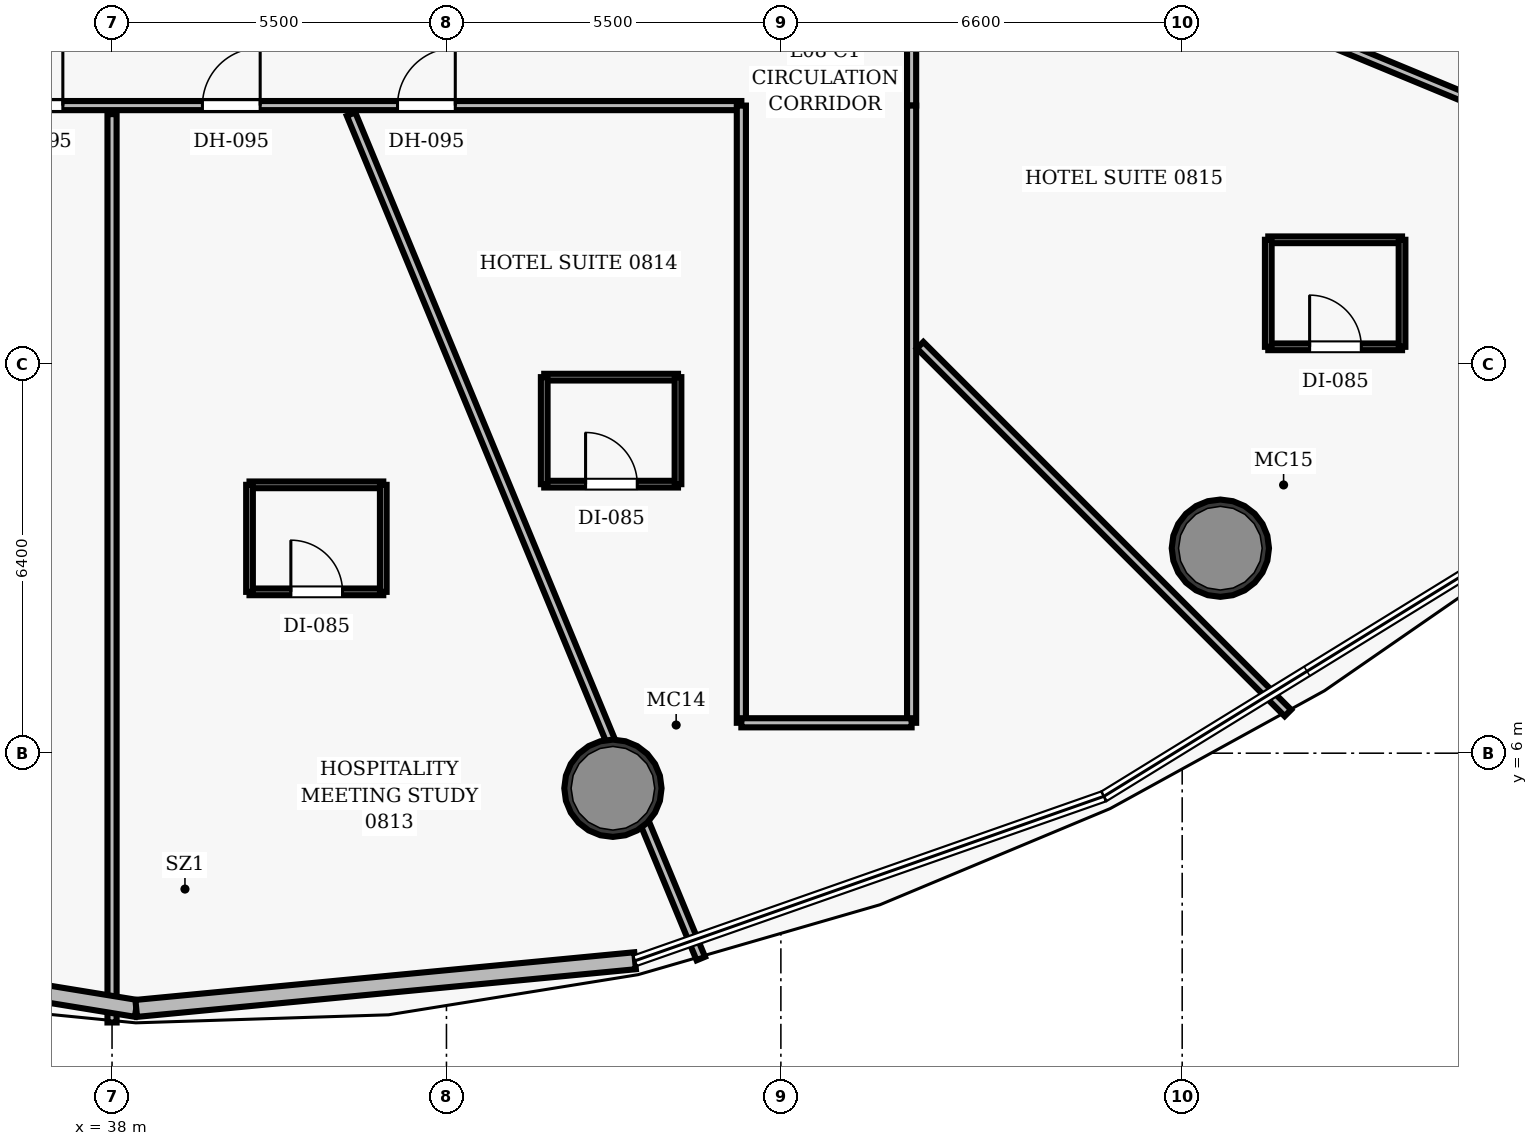
"""IFC4 building model, lengths in metres.
Left out: names, types, materials, properties, quantities, classifications, styles, units other than length and angle.
Written with IfcOpenShell. Run it as: python <this file> out.ifc"""

import sys

from ifc_helpers import new_model, si_unit, direction, frame, frame_2d, origin, origin_2d, place, context, subcontext, project, spatial, rectangle, hollow_circle, extrude, element, fill, save


model = new_model("IFC4")
c1 = context("Model", 3, precision=1e-05, world=origin(), true_north=direction((0.0, 1.0)))
c2 = subcontext(c1, "Body", "Model", "MODEL_VIEW")
j1 = project(units=[si_unit("LENGTHUNIT", "METRE"), si_unit("PLANEANGLEUNIT", "RADIAN")], contexts=[c1])
p1 = place(None, origin())
s1 = spatial("IfcSite", under=j1, at=p1, CompositionType="ELEMENT")
p2 = place(p1, origin())
s2 = spatial("IfcBuilding", under=s1, at=p2, CompositionType="ELEMENT")
p3 = place(p2, frame((0.0, 0.0, 44.9)))
s3 = spatial("IfcBuildingStorey", under=s2, at=p3, CompositionType="ELEMENT", Elevation=44.9)
for number, where, z_axis, x_axis in (
    (1, (46.238, 5.423, 0.0), (0.0, 0.0, 1.0), (1.0, 0.0, 0.0)),
    (2, (56.228, 9.371, 0.0), (0.0, 0.0, 1.0), (1.0, 0.0, 0.0)),
):
    element("IfcColumn", number, at=place(p3, frame(where, z_axis=z_axis, x_axis=x_axis)), inside=s3, PredefinedType="COLUMN", context=c2, shape_type="SweptSolid", body=[
        extrude(hollow_circle(Radius=0.8, WallThickness=0.06, at=origin_2d()), origin(), (0.0, 0.0, 1.0), 3.5),
    ])
p4 = place(p3, frame((24.85, 16.65, 0.0), z_axis=(0.0, 0.0, 1.0), x_axis=(1.0, 0.0, 0.0)))
e3 = element("IfcWall", 3, at=p4, inside=s3, PredefinedType="PARTITIONING", context=c2, shape_type="SweptSolid", body=[
    extrude(rectangle(XDim=23.5, YDim=0.15, at=frame_2d((11.75, 0.0))), origin(), (0.0, 0.0, 1.0), 2.6),
])
p5 = place(p4, frame((7.505, 0.0, 0.0)))
e4 = element("IfcOpeningElement", 4, at=p5, cuts=e3, PredefinedType="OPENING", context=c2, shape_type="SweptSolid", body=[
    extrude(rectangle(XDim=0.95, YDim=2.15, at=frame_2d((0.475, 1.075))), frame((0.0, 0.085, 0.0), z_axis=(0.0, -1.0, 0.0), x_axis=(1.0, 0.0, 0.0)), (0.0, 0.0, 1.0), 0.17),
])
p6 = place(p4, frame((11.391, 0.0, 0.0)))
e5 = element("IfcOpeningElement", 5, at=p6, cuts=e3, PredefinedType="OPENING", context=c2, shape_type="SweptSolid", body=[
    extrude(rectangle(XDim=0.95, YDim=2.15, at=frame_2d((0.475, 1.075))), frame((0.0, 0.085, 0.0), z_axis=(0.0, -1.0, 0.0), x_axis=(1.0, 0.0, 0.0)), (0.0, 0.0, 1.0), 0.17),
])
p7 = place(p4, frame((14.636, 0.0, 0.0)))
e6 = element("IfcOpeningElement", 6, at=p7, cuts=e3, PredefinedType="OPENING", context=c2, shape_type="SweptSolid", body=[
    extrude(rectangle(XDim=0.95, YDim=2.15, at=frame_2d((0.475, 1.075))), frame((0.0, 0.085, 0.0), z_axis=(0.0, -1.0, 0.0), x_axis=(1.0, 0.0, 0.0)), (0.0, 0.0, 1.0), 0.17),
])
p8 = place(p4, frame((17.845, 0.0, 0.0)))
e7 = element("IfcOpeningElement", 7, at=p8, cuts=e3, PredefinedType="OPENING", context=c2, shape_type="SweptSolid", body=[
    extrude(rectangle(XDim=0.95, YDim=2.15, at=frame_2d((0.475, 1.075))), frame((0.0, 0.085, 0.0), z_axis=(0.0, -1.0, 0.0), x_axis=(1.0, 0.0, 0.0)), (0.0, 0.0, 1.0), 0.17),
])
p9 = place(p3, frame((51.15, 16.65, 0.0), z_axis=(0.0, 0.0, 1.0), x_axis=(0.0, 1.0, 0.0)))
e8 = element("IfcWall", 8, at=p9, inside=s3, PredefinedType="PARTITIONING", context=c2, shape_type="SweptSolid", body=[
    extrude(rectangle(XDim=15.9, YDim=0.15, at=frame_2d((7.95, 0.0))), origin(), (0.0, 0.0, 1.0), 2.6),
])
p10 = place(p9, frame((10.101, 0.0, 0.0)))
e9 = element("IfcOpeningElement", 9, at=p10, cuts=e8, PredefinedType="OPENING", context=c2, shape_type="SweptSolid", body=[
    extrude(rectangle(XDim=0.95, YDim=2.15, at=frame_2d((0.475, 1.075))), frame((0.0, 0.085, 0.0), z_axis=(0.0, -1.0, 0.0), x_axis=(1.0, 0.0, 0.0)), (0.0, 0.0, 1.0), 0.17),
])
p11 = place(p9, frame((2.222, 0.0, 0.0)))
e10 = element("IfcOpeningElement", 10, at=p11, cuts=e8, PredefinedType="OPENING", context=c2, shape_type="SweptSolid", body=[
    extrude(rectangle(XDim=0.95, YDim=2.15, at=frame_2d((0.475, 1.075))), frame((0.0, 0.085, 0.0), z_axis=(0.0, -1.0, 0.0), x_axis=(1.0, 0.0, 0.0)), (0.0, 0.0, 1.0), 0.17),
])
p12 = place(p9, frame((7.649, 0.0, 0.0)))
e11 = element("IfcOpeningElement", 11, at=p12, cuts=e8, PredefinedType="OPENING", context=c2, shape_type="SweptSolid", body=[
    extrude(rectangle(XDim=0.95, YDim=2.15, at=frame_2d((0.475, 1.075))), frame((0.0, 0.085, 0.0), z_axis=(0.0, -1.0, 0.0), x_axis=(1.0, 0.0, 0.0)), (0.0, 0.0, 1.0), 0.17),
])
for number, where, z_axis, x_axis in (
    (12, (48.35, 6.5, 0.0), (0.0, 0.0, 1.0), (0.0, 1.0, 0.0)),
    (13, (51.15, 6.5, 0.0), (0.0, 0.0, 1.0), (0.0, 1.0, 0.0)),
):
    element("IfcWall", number, at=place(p3, frame(where, z_axis=z_axis, x_axis=x_axis)), inside=s3, PredefinedType="PARTITIONING", context=c2, shape_type="SweptSolid", body=[
        extrude(rectangle(XDim=10.15, YDim=0.15, at=frame_2d((5.075, 0.0))), origin(), (0.0, 0.0, 1.0), 2.6),
    ])
p13 = place(p3, frame((48.35, 6.5, 0.0), z_axis=(0.0, 0.0, 1.0), x_axis=(1.0, 0.0, 0.0)))
e14 = element("IfcWall", 14, at=p13, inside=s3, PredefinedType="PARTITIONING", context=c2, shape_type="SweptSolid", body=[
    extrude(rectangle(XDim=2.8, YDim=0.15, at=frame_2d((1.4, 0.0))), origin(), (0.0, 0.0, 1.0), 2.6),
])
p14 = place(p3, frame((38.0, 16.51, 0.0), z_axis=(0.0, 0.0, 1.0), x_axis=(0.0, -1.0, 0.0)))
e15 = element("IfcWall", 15, at=p14, inside=s3, PredefinedType="PARTITIONING", context=c2, shape_type="SweptSolid", body=[
    extrude(rectangle(XDim=14.938, YDim=0.15, at=frame_2d((7.469, 0.0))), origin(), (0.0, 0.0, 1.0), 2.6),
])
p15 = place(p3, frame((41.931, 16.51, 0.0), z_axis=(0.0, 0.0, 1.0), x_axis=(0.382685073251, -0.923878852832, 0.0)))
e16 = element("IfcWall", 16, at=p15, inside=s3, PredefinedType="PARTITIONING", context=c2, shape_type="SweptSolid", body=[
    extrude(rectangle(XDim=15.031, YDim=0.15, at=frame_2d((7.516, 0.0))), origin(), (0.0, 0.0, 1.0), 2.6),
])
p16 = place(p3, frame((51.29, 12.71, 0.0), z_axis=(0.0, 0.0, 1.0), x_axis=(0.707106781187, -0.707106781187, 0.0)))
e17 = element("IfcWall", 17, at=p16, inside=s3, PredefinedType="PARTITIONING", context=c2, shape_type="SweptSolid", body=[
    extrude(rectangle(XDim=8.554, YDim=0.15, at=frame_2d((4.277, 0.0))), origin(), (0.0, 0.0, 1.0), 2.6),
])
p17 = place(p3, frame((51.29, 20.495, 0.0), z_axis=(0.0, 0.0, 1.0), x_axis=(0.923878179833, -0.382686698003, 0.0)))
e18 = element("IfcWall", 18, at=p17, inside=s3, PredefinedType="PARTITIONING", context=c2, shape_type="SweptSolid", body=[
    extrude(rectangle(XDim=16.375, YDim=0.15, at=frame_2d((8.188, 0.0))), origin(), (0.0, 0.0, 1.0), 2.6),
])
p18 = place(p3, frame((40.261, 8.653, 0.0), z_axis=(0.0, 0.0, 1.0), x_axis=(1.0, 0.0, 0.0)))
e19 = element("IfcWall", 19, at=p18, inside=s3, PredefinedType="PARTITIONING", context=c2, shape_type="SweptSolid", body=[
    extrude(rectangle(XDim=2.2, YDim=0.11, at=frame_2d((1.1, 0.0))), origin(), (0.0, 0.0, 1.0), 2.6),
])
p19 = place(p18, frame((0.68, 0.0, 0.0)))
e20 = element("IfcOpeningElement", 20, at=p19, cuts=e19, PredefinedType="OPENING", context=c2, shape_type="SweptSolid", body=[
    extrude(rectangle(XDim=0.85, YDim=2.1, at=frame_2d((0.425, 1.05))), frame((0.0, 0.065, 0.0), z_axis=(0.0, -1.0, 0.0), x_axis=(1.0, 0.0, 0.0)), (0.0, 0.0, 1.0), 0.13),
])
p20 = place(p3, frame((40.261, 10.413, 0.0), z_axis=(0.0, 0.0, 1.0), x_axis=(1.0, 0.0, 0.0)))
e21 = element("IfcWall", 21, at=p20, inside=s3, PredefinedType="PARTITIONING", context=c2, shape_type="SweptSolid", body=[
    extrude(rectangle(XDim=2.2, YDim=0.11, at=frame_2d((1.1, 0.0))), origin(), (0.0, 0.0, 1.0), 2.6),
])
for number, where, z_axis, x_axis in (
    (22, (40.261, 8.653, 0.0), (0.0, 0.0, 1.0), (0.0, 1.0, 0.0)),
    (23, (42.461, 8.653, 0.0), (0.0, 0.0, 1.0), (0.0, 1.0, 0.0)),
):
    element("IfcWall", number, at=place(p3, frame(where, z_axis=z_axis, x_axis=x_axis)), inside=s3, PredefinedType="PARTITIONING", context=c2, shape_type="SweptSolid", body=[
        extrude(rectangle(XDim=1.76, YDim=0.11, at=frame_2d((0.88, 0.0))), origin(), (0.0, 0.0, 1.0), 2.6),
    ])
p21 = place(p3, frame((45.108, 10.424, 0.0), z_axis=(0.0, 0.0, 1.0), x_axis=(1.0, 0.0, 0.0)))
e24 = element("IfcWall", 24, at=p21, inside=s3, PredefinedType="PARTITIONING", context=c2, shape_type="SweptSolid", body=[
    extrude(rectangle(XDim=2.2, YDim=0.11, at=frame_2d((1.1, 0.0))), origin(), (0.0, 0.0, 1.0), 2.6),
])
p22 = place(p21, frame((0.68, 0.0, 0.0)))
e25 = element("IfcOpeningElement", 25, at=p22, cuts=e24, PredefinedType="OPENING", context=c2, shape_type="SweptSolid", body=[
    extrude(rectangle(XDim=0.85, YDim=2.1, at=frame_2d((0.425, 1.05))), frame((0.0, 0.065, 0.0), z_axis=(0.0, -1.0, 0.0), x_axis=(1.0, 0.0, 0.0)), (0.0, 0.0, 1.0), 0.13),
])
p23 = place(p3, frame((45.108, 12.184, 0.0), z_axis=(0.0, 0.0, 1.0), x_axis=(1.0, 0.0, 0.0)))
e26 = element("IfcWall", 26, at=p23, inside=s3, PredefinedType="PARTITIONING", context=c2, shape_type="SweptSolid", body=[
    extrude(rectangle(XDim=2.2, YDim=0.11, at=frame_2d((1.1, 0.0))), origin(), (0.0, 0.0, 1.0), 2.6),
])
for number, where, z_axis, x_axis in (
    (27, (45.108, 10.424, 0.0), (0.0, 0.0, 1.0), (0.0, 1.0, 0.0)),
    (28, (47.308, 10.424, 0.0), (0.0, 0.0, 1.0), (0.0, 1.0, 0.0)),
):
    element("IfcWall", number, at=place(p3, frame(where, z_axis=z_axis, x_axis=x_axis)), inside=s3, PredefinedType="PARTITIONING", context=c2, shape_type="SweptSolid", body=[
        extrude(rectangle(XDim=1.76, YDim=0.11, at=frame_2d((0.88, 0.0))), origin(), (0.0, 0.0, 1.0), 2.6),
    ])
p24 = place(p3, frame((57.016, 12.683, 0.0), z_axis=(0.0, 0.0, 1.0), x_axis=(1.0, 0.0, 0.0)))
e29 = element("IfcWall", 29, at=p24, inside=s3, PredefinedType="PARTITIONING", context=c2, shape_type="SweptSolid", body=[
    extrude(rectangle(XDim=2.2, YDim=0.11, at=frame_2d((1.1, 0.0))), origin(), (0.0, 0.0, 1.0), 2.6),
])
p25 = place(p24, frame((0.68, 0.0, 0.0)))
e30 = element("IfcOpeningElement", 30, at=p25, cuts=e29, PredefinedType="OPENING", context=c2, shape_type="SweptSolid", body=[
    extrude(rectangle(XDim=0.85, YDim=2.1, at=frame_2d((0.425, 1.05))), frame((0.0, 0.065, 0.0), z_axis=(0.0, -1.0, 0.0), x_axis=(1.0, 0.0, 0.0)), (0.0, 0.0, 1.0), 0.13),
])
p26 = place(p3, frame((57.016, 14.443, 0.0), z_axis=(0.0, 0.0, 1.0), x_axis=(1.0, 0.0, 0.0)))
e31 = element("IfcWall", 31, at=p26, inside=s3, PredefinedType="PARTITIONING", context=c2, shape_type="SweptSolid", body=[
    extrude(rectangle(XDim=2.2, YDim=0.11, at=frame_2d((1.1, 0.0))), origin(), (0.0, 0.0, 1.0), 2.6),
])
for number, where, z_axis, x_axis in (
    (32, (57.016, 12.683, 0.0), (0.0, 0.0, 1.0), (0.0, 1.0, 0.0)),
    (33, (59.216, 12.683, 0.0), (0.0, 0.0, 1.0), (0.0, 1.0, 0.0)),
):
    element("IfcWall", number, at=place(p3, frame(where, z_axis=z_axis, x_axis=x_axis)), inside=s3, PredefinedType="PARTITIONING", context=c2, shape_type="SweptSolid", body=[
        extrude(rectangle(XDim=1.76, YDim=0.11, at=frame_2d((0.88, 0.0))), origin(), (0.0, 0.0, 1.0), 2.6),
    ])
for number, where, z_axis, x_axis in (
    (34, (38.398, 1.803, 0.0), (0.0, 0.0, 1.0), (-0.987, 0.161, 0.0)),
    (35, (46.602, 2.587, 0.0), (0.0, 0.0, 1.0), (-0.995, -0.095, 0.0)),
):
    element("IfcWall", number, at=place(p3, frame(where, z_axis=z_axis, x_axis=x_axis)), inside=s3, PredefinedType="SOLIDWALL", context=c2, shape_type="SweptSolid", body=[
        extrude(rectangle(XDim=8.241, YDim=0.28, at=frame_2d((4.121, 0.0))), origin(), (0.0, 0.0, 1.0), 3.25),
    ])
p27 = place(p6, origin())
e36 = element("IfcDoor", 36, at=p27, inside=s3, OperationType="SINGLE_SWING_RIGHT", PredefinedType="DOOR", context=c2, shape_type="SweptSolid", body=[
    extrude(rectangle(XDim=0.95, YDim=2.15, at=frame_2d((0.475, 1.075))), frame((0.0, 0.025, 0.0), z_axis=(0.0, -1.0, 0.0), x_axis=(1.0, 0.0, 0.0)), (0.0, 0.0, 1.0), 0.05),
])
fill(e5, e36)
p28 = place(p7, origin())
e37 = element("IfcDoor", 37, at=p28, inside=s3, OperationType="SINGLE_SWING_RIGHT", PredefinedType="DOOR", context=c2, shape_type="SweptSolid", body=[
    extrude(rectangle(XDim=0.95, YDim=2.15, at=frame_2d((0.475, 1.075))), frame((0.0, 0.025, 0.0), z_axis=(0.0, -1.0, 0.0), x_axis=(1.0, 0.0, 0.0)), (0.0, 0.0, 1.0), 0.05),
])
fill(e6, e37)
p29 = place(p19, origin())
e38 = element("IfcDoor", 38, at=p29, inside=s3, OperationType="SINGLE_SWING_LEFT", PredefinedType="DOOR", context=c2, shape_type="SweptSolid", body=[
    extrude(rectangle(XDim=0.85, YDim=2.1, at=frame_2d((0.425, 1.05))), frame((0.0, 0.025, 0.0), z_axis=(0.0, -1.0, 0.0), x_axis=(1.0, 0.0, 0.0)), (0.0, 0.0, 1.0), 0.05),
])
fill(e20, e38)
p30 = place(p8, origin())
e39 = element("IfcDoor", 39, at=p30, inside=s3, OperationType="SINGLE_SWING_RIGHT", PredefinedType="DOOR", context=c2, shape_type="SweptSolid", body=[
    extrude(rectangle(XDim=0.95, YDim=2.15, at=frame_2d((0.475, 1.075))), frame((0.0, 0.025, 0.0), z_axis=(0.0, -1.0, 0.0), x_axis=(1.0, 0.0, 0.0)), (0.0, 0.0, 1.0), 0.05),
])
fill(e7, e39)
p31 = place(p22, origin())
e40 = element("IfcDoor", 40, at=p31, inside=s3, OperationType="SINGLE_SWING_LEFT", PredefinedType="DOOR", context=c2, shape_type="SweptSolid", body=[
    extrude(rectangle(XDim=0.85, YDim=2.1, at=frame_2d((0.425, 1.05))), frame((0.0, 0.025, 0.0), z_axis=(0.0, -1.0, 0.0), x_axis=(1.0, 0.0, 0.0)), (0.0, 0.0, 1.0), 0.05),
])
fill(e25, e40)
p32 = place(p25, origin())
e41 = element("IfcDoor", 41, at=p32, inside=s3, OperationType="SINGLE_SWING_LEFT", PredefinedType="DOOR", context=c2, shape_type="SweptSolid", body=[
    extrude(rectangle(XDim=0.85, YDim=2.1, at=frame_2d((0.425, 1.05))), frame((0.0, 0.025, 0.0), z_axis=(0.0, -1.0, 0.0), x_axis=(1.0, 0.0, 0.0)), (0.0, 0.0, 1.0), 0.05),
])
fill(e30, e41)
save(model, sys.argv[1])
